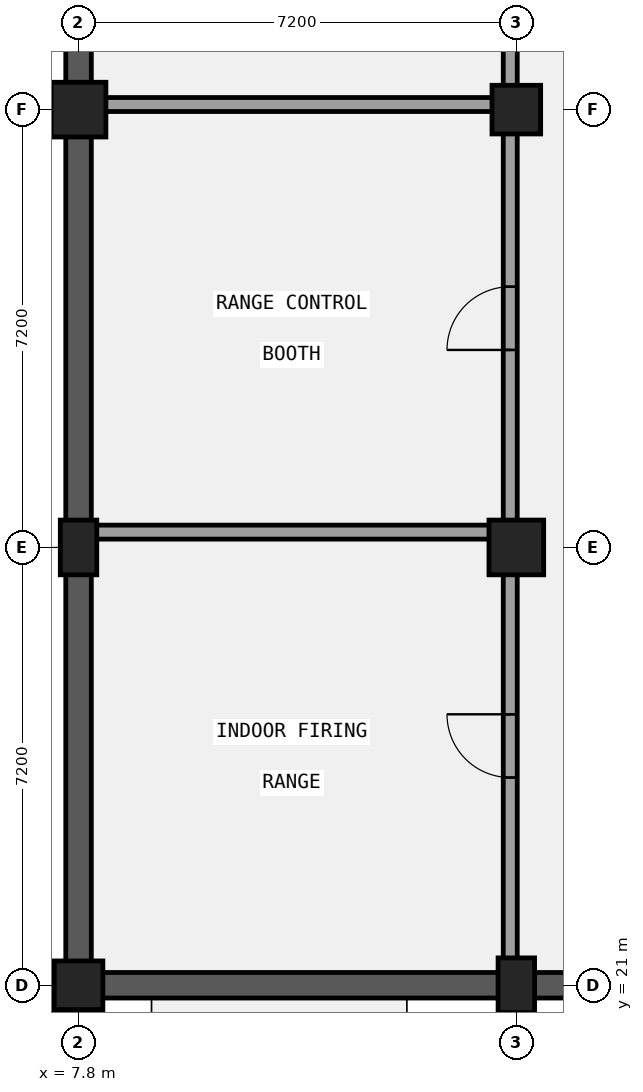
"""IFC4 building model, lengths in metres.
Left out: names, types, materials, properties, quantities, classifications, styles, units other than length and angle.
Written with IfcOpenShell. Run it as: python <this file> out.ifc"""

import sys

from ifc_helpers import new_model, si_unit, direction, frame, frame_2d, origin, origin_2d, place, context, subcontext, project, spatial, rectangle, extrude, element, fill, save


model = new_model("IFC4")
c1 = context("Model", 3, precision=1e-05, world=origin(), true_north=direction((0.0, 1.0)))
c2 = subcontext(c1, "Body", "Model", "MODEL_VIEW")
j1 = project(units=[si_unit("LENGTHUNIT", "METRE"), si_unit("PLANEANGLEUNIT", "RADIAN")], contexts=[c1])
p1 = place(None, origin())
s1 = spatial("IfcSite", under=j1, at=p1, CompositionType="ELEMENT")
p2 = place(p1, origin())
s2 = spatial("IfcBuilding", under=s1, at=p2, CompositionType="ELEMENT")
p3 = place(p2, frame((0.0, 0.0, -4.2)))
s3 = spatial("IfcBuildingStorey", under=s2, at=p3, CompositionType="ELEMENT", Elevation=-4.2)
p4 = place(p3, frame((29.61, 21.0, 0.0), z_axis=(0.0, 0.0, 1.0), x_axis=(-1.0, 0.0, 0.0)))
e1 = element("IfcWall", 1, at=p4, inside=s3, PredefinedType="USERDEFINED", context=c2, shape_type="SweptSolid", body=[
    extrude(rectangle(XDim=22.02, YDim=0.42, at=frame_2d((11.01, 0.0))), origin(), (0.0, 0.0, 1.0), 2.98),
])
p5 = place(p3, frame((7.8, 21.2, 0.0), z_axis=(0.0, 0.0, 1.0), x_axis=(0.0, 1.0, 0.0)))
e2 = element("IfcWall", 2, at=p5, inside=s3, PredefinedType="USERDEFINED", context=c2, shape_type="SweptSolid", body=[
    extrude(rectangle(XDim=35.6, YDim=0.42, at=frame_2d((17.8, 0.0))), origin(), (0.0, 0.0, 1.0), 2.88),
])
p6 = place(p3, frame((7.8, 21.0, 0.0), z_axis=(0.0, 0.0, 1.0), x_axis=(1.0, 0.0, 0.0)))
e3 = element("IfcColumn", 3, at=p6, inside=s3, PredefinedType="COLUMN", context=c2, shape_type="SweptSolid", body=[
    extrude(rectangle(XDim=0.8, YDim=0.8, at=origin_2d()), origin(), (0.0, 0.0, 1.0), 4.2),
])
p7 = place(p3, frame((7.8, 28.2, 0.0), z_axis=(0.0, 0.0, 1.0), x_axis=(1.0, 0.0, 0.0)))
e4 = element("IfcColumn", 4, at=p7, inside=s3, PredefinedType="COLUMN", context=c2, shape_type="SweptSolid", body=[
    extrude(rectangle(XDim=0.6, YDim=0.9, at=origin_2d()), origin(), (0.0, 0.0, 1.0), 4.2),
])
p8 = place(p3, frame((7.8, 35.4, 0.0), z_axis=(0.0, 0.0, 1.0), x_axis=(1.0, 0.0, 0.0)))
e5 = element("IfcColumn", 5, at=p8, inside=s3, PredefinedType="COLUMN", context=c2, shape_type="SweptSolid", body=[
    extrude(rectangle(XDim=0.9, YDim=0.9, at=origin_2d()), origin(), (0.0, 0.0, 1.0), 4.2),
])
p9 = place(p3, frame((15.0, 21.0, 0.0), z_axis=(0.0, 0.0, 1.0), x_axis=(1.0, 0.0, 0.0)))
e6 = element("IfcColumn", 6, at=p9, inside=s3, PredefinedType="COLUMN", context=c2, shape_type="SweptSolid", body=[
    extrude(rectangle(XDim=0.6, YDim=0.9, at=origin_2d()), origin(), (0.0, 0.0, 1.0), 4.2),
])
p10 = place(p3, frame((15.0, 28.2, 0.0), z_axis=(0.0, 0.0, 1.0), x_axis=(1.0, 0.0, 0.0)))
e7 = element("IfcColumn", 7, at=p10, inside=s3, PredefinedType="COLUMN", context=c2, shape_type="SweptSolid", body=[
    extrude(rectangle(XDim=0.9, YDim=0.9, at=origin_2d()), origin(), (0.0, 0.0, 1.0), 4.2),
])
p11 = place(p3, frame((15.0, 35.4, 0.0), z_axis=(0.0, 0.0, 1.0), x_axis=(1.0, 0.0, 0.0)))
e8 = element("IfcColumn", 8, at=p11, inside=s3, PredefinedType="COLUMN", context=c2, shape_type="SweptSolid", body=[
    extrude(rectangle(XDim=0.8, YDim=0.8, at=origin_2d()), origin(), (0.0, 0.0, 1.0), 4.2),
])
p12 = place(p3, frame((14.9, 21.42, 0.0), z_axis=(0.0, 0.0, 1.0), x_axis=(0.0, 1.0, 0.0)))
e9 = element("IfcWall", 9, at=p12, inside=s3, PredefinedType="PARTITIONING", context=c2, shape_type="SweptSolid", body=[
    extrude(rectangle(XDim=7.032, YDim=0.23, at=frame_2d((3.516, 0.0))), origin(), (0.0, 0.0, 1.0), 3.28),
])
p13 = place(p12, frame((2.996, 0.0, 0.0)))
e10 = element("IfcOpeningElement", 10, at=p13, cuts=e9, PredefinedType="OPENING", context=c2, shape_type="SweptSolid", body=[
    extrude(rectangle(XDim=1.04, YDim=2.1, at=frame_2d((0.52, 1.05))), frame((0.0, 0.125, 0.0), z_axis=(0.0, -1.0, 0.0), x_axis=(1.0, 0.0, 0.0)), (0.0, 0.0, 1.0), 0.25),
])
p14 = place(p3, frame((7.98, 28.452, 0.0), z_axis=(0.0, 0.0, 1.0), x_axis=(1.0, 0.0, 0.0)))
e11 = element("IfcWall", 11, at=p14, inside=s3, PredefinedType="PARTITIONING", context=c2, shape_type="SweptSolid", body=[
    extrude(rectangle(XDim=6.92, YDim=0.23, at=frame_2d((3.46, 0.0))), origin(), (0.0, 0.0, 1.0), 3.03),
])
p15 = place(p3, frame((14.9, 28.452, 0.0), z_axis=(0.0, 0.0, 1.0), x_axis=(0.0, 1.0, 0.0)))
e12 = element("IfcWall", 12, at=p15, inside=s3, PredefinedType="PARTITIONING", context=c2, shape_type="SweptSolid", body=[
    extrude(rectangle(XDim=7.032, YDim=0.23, at=frame_2d((3.516, 0.0))), origin(), (0.0, 0.0, 1.0), 3.23),
])
p16 = place(p15, frame((2.996, 0.0, 0.0)))
e13 = element("IfcOpeningElement", 13, at=p16, cuts=e12, PredefinedType="OPENING", context=c2, shape_type="SweptSolid", body=[
    extrude(rectangle(XDim=1.04, YDim=2.22, at=frame_2d((0.52, 1.11))), frame((0.0, 0.125, 0.0), z_axis=(0.0, -1.0, 0.0), x_axis=(1.0, 0.0, 0.0)), (0.0, 0.0, 1.0), 0.25),
])
p17 = place(p3, frame((7.98, 35.484, 0.0), z_axis=(0.0, 0.0, 1.0), x_axis=(1.0, 0.0, 0.0)))
e14 = element("IfcWall", 14, at=p17, inside=s3, PredefinedType="PARTITIONING", context=c2, shape_type="SweptSolid", body=[
    extrude(rectangle(XDim=6.92, YDim=0.23, at=frame_2d((3.46, 0.0))), origin(), (0.0, 0.0, 1.0), 2.98),
])
p18 = place(p3, frame((14.9, 35.484, 0.0), z_axis=(0.0, 0.0, 1.0), x_axis=(0.0, 1.0, 0.0)))
e15 = element("IfcWall", 15, at=p18, inside=s3, PredefinedType="PARTITIONING", context=c2, shape_type="SweptSolid", body=[
    extrude(rectangle(XDim=7.032, YDim=0.23, at=frame_2d((3.516, 0.0))), origin(), (0.0, 0.0, 1.0), 3.23),
])
p19 = place(p18, frame((2.996, 0.0, 0.0)))
e16 = element("IfcOpeningElement", 16, at=p19, cuts=e15, PredefinedType="OPENING", context=c2, shape_type="SweptSolid", body=[
    extrude(rectangle(XDim=1.04, YDim=2.35, at=frame_2d((0.52, 1.175))), frame((0.0, 0.125, 0.0), z_axis=(0.0, -1.0, 0.0), x_axis=(1.0, 0.0, 0.0)), (0.0, 0.0, 1.0), 0.25),
])
p20 = place(p13, frame((1.04, 0.0, 0.0), z_axis=(0.0, 0.0, 1.0), x_axis=(-1.0, 0.0, 0.0)))
e17 = element("IfcDoor", 17, at=p20, inside=s3, OperationType="SINGLE_SWING_RIGHT", PredefinedType="DOOR", context=c2, shape_type="SweptSolid", body=[
    extrude(rectangle(XDim=1.04, YDim=2.1, at=frame_2d((0.52, 1.05))), frame((0.0, 0.025, 0.0), z_axis=(0.0, -1.0, 0.0), x_axis=(1.0, 0.0, 0.0)), (0.0, 0.0, 1.0), 0.05),
])
fill(e10, e17)
p21 = place(p16, frame((1.04, 0.0, 0.0), z_axis=(0.0, 0.0, 1.0), x_axis=(-1.0, 0.0, 0.0)))
e18 = element("IfcDoor", 18, at=p21, inside=s3, OperationType="SINGLE_SWING_LEFT", PredefinedType="DOOR", context=c2, shape_type="SweptSolid", body=[
    extrude(rectangle(XDim=1.04, YDim=2.22, at=frame_2d((0.52, 1.11))), frame((0.0, 0.025, 0.0), z_axis=(0.0, -1.0, 0.0), x_axis=(1.0, 0.0, 0.0)), (0.0, 0.0, 1.0), 0.05),
])
fill(e13, e18)
save(model, sys.argv[1])
